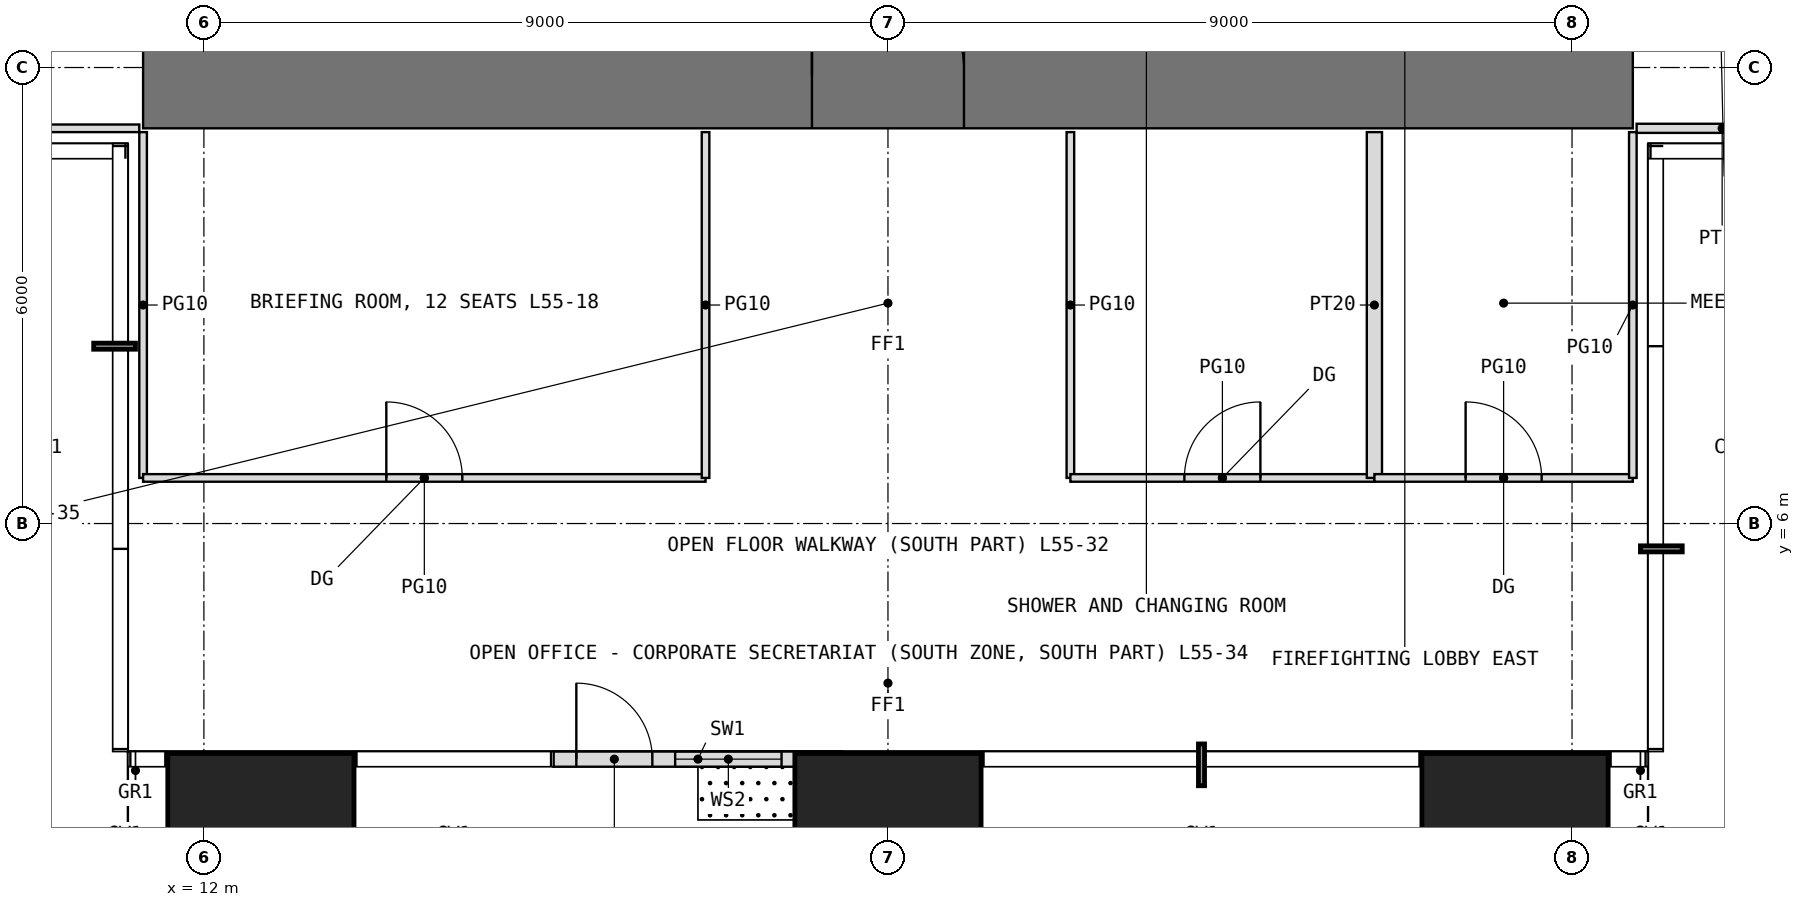
"""IFC4 building model, lengths in metres.
Left out: names, types, materials, properties, quantities, classifications, styles, units other than length and angle.
Written with IfcOpenShell. Run it as: python <this file> out.ifc"""

import sys

from ifc_helpers import new_model, si_unit, direction, frame, frame_2d, origin, origin_2d, place, context, subcontext, project, spatial, rectangle, extrude, element, fill, save


model = new_model("IFC4")
c1 = context("Model", 3, precision=1e-05, world=origin(), true_north=direction((0.0, 1.0)))
c2 = subcontext(c1, "Body", "Model", "MODEL_VIEW")
j1 = project(units=[si_unit("LENGTHUNIT", "METRE"), si_unit("PLANEANGLEUNIT", "RADIAN")], contexts=[c1])
p1 = place(None, origin())
s1 = spatial("IfcSite", under=j1, at=p1, CompositionType="ELEMENT")
p2 = place(p1, origin())
s2 = spatial("IfcBuilding", under=s1, at=p2, CompositionType="ELEMENT")
p3 = place(p2, frame((0.0, 0.0, 230.5)))
s3 = spatial("IfcBuildingStorey", under=s2, at=p3, CompositionType="ELEMENT", Elevation=230.5)
for number, where, z_axis, x_axis in (
    (1, (12.75, 1.75, 0.0), (0.0, 0.0, 1.0), (1.0, 0.0, 0.0)),
    (2, (21.0, 1.75, 0.0), (0.0, 0.0, 1.0), (1.0, 0.0, 0.0)),
    (3, (29.25, 1.75, 0.0), (0.0, 0.0, 1.0), (1.0, 0.0, 0.0)),
):
    element("IfcColumn", number, at=place(p3, frame(where, z_axis=z_axis, x_axis=x_axis)), inside=s3, PredefinedType="COLUMN", context=c2, shape_type="SweptSolid", body=[
        extrude(rectangle(XDim=2.45, YDim=2.45, at=origin_2d()), origin(), (0.0, 0.0, 1.0), 4.0),
    ])
p4 = place(p3, frame((16.6, 2.9, 0.0), z_axis=(0.0, 0.0, 1.0), x_axis=(1.0, 0.0, 0.0)))
e4 = element("IfcWall", 4, at=p4, inside=s3, PredefinedType="USERDEFINED", context=c2, shape_type="SweptSolid", body=[
    extrude(rectangle(XDim=3.8, YDim=0.2, at=frame_2d((1.9, 0.0))), origin(), (0.0, 0.0, 1.0), 3.55),
])
p5 = place(p4, frame((0.3, 0.0, 0.0)))
e5 = element("IfcOpeningElement", 5, at=p5, cuts=e4, PredefinedType="OPENING", context=c2, shape_type="SweptSolid", body=[
    extrude(rectangle(XDim=1.0, YDim=2.4, at=frame_2d((0.5, 1.2))), frame((0.0, 0.11, 0.0), z_axis=(0.0, -1.0, 0.0), x_axis=(1.0, 0.0, 0.0)), (0.0, 0.0, 1.0), 0.22),
])
p6 = place(p4, frame((1.6, 0.0, 0.3)))
e6 = element("IfcOpeningElement", 6, at=p6, cuts=e4, PredefinedType="OPENING", context=c2, shape_type="SweptSolid", body=[
    extrude(rectangle(XDim=1.4, YDim=2.7, at=frame_2d((0.7, 1.35))), frame((0.0, 0.11, 0.0), z_axis=(0.0, -1.0, 0.0), x_axis=(1.0, 0.0, 0.0)), (0.0, 0.0, 1.0), 0.22),
])
p7 = place(p3, frame((11.2, 11.9, -0.05), z_axis=(0.0, 0.0, 1.0), x_axis=(1.0, 0.0, 0.0)))
e7 = element("IfcWall", 7, at=p7, inside=s3, PredefinedType="SHEAR", context=c2, shape_type="SweptSolid", body=[
    extrude(rectangle(XDim=19.6, YDim=1.4, at=frame_2d((9.8, 0.0))), origin(), (0.0, 0.0, 1.0), 3.8),
])
p8 = place(p7, frame((8.8, 0.0, 0.05)))
e8 = element("IfcOpeningElement", 8, at=p8, cuts=e7, PredefinedType="OPENING", context=c2, shape_type="SweptSolid", body=[
    extrude(rectangle(XDim=2.0, YDim=2.2, at=frame_2d((1.0, 1.1))), frame((0.0, 0.71, 0.0), z_axis=(0.0, -1.0, 0.0), x_axis=(1.0, 0.0, 0.0)), (0.0, 0.0, 1.0), 1.42),
])
p9 = place(p3, frame((8.2, 11.2, 0.0), z_axis=(0.0, 0.0, 1.0), x_axis=(1.0, 0.0, 0.0)))
e9 = element("IfcWall", 9, at=p9, inside=s3, PredefinedType="PARTITIONING", context=c2, shape_type="SweptSolid", body=[
    extrude(rectangle(XDim=2.95, YDim=0.1, at=frame_2d((1.475, 0.0))), origin(), (0.0, 0.0, 1.0), 3.55),
])
p10 = place(p3, frame((11.2, 6.6, 0.0), z_axis=(0.0, 0.0, 1.0), x_axis=(0.0, 1.0, 0.0)))
e10 = element("IfcWall", 10, at=p10, inside=s3, PredefinedType="PARTITIONING", context=c2, shape_type="SweptSolid", body=[
    extrude(rectangle(XDim=4.55, YDim=0.1, at=frame_2d((2.275, 0.0))), origin(), (0.0, 0.0, 1.0), 3.55),
])
p11 = place(p3, frame((11.2, 6.6, 0.0), z_axis=(0.0, 0.0, 1.0), x_axis=(1.0, 0.0, 0.0)))
e11 = element("IfcWall", 11, at=p11, inside=s3, PredefinedType="PARTITIONING", context=c2, shape_type="SweptSolid", body=[
    extrude(rectangle(XDim=7.4, YDim=0.1, at=frame_2d((3.7, 0.0))), origin(), (0.0, 0.0, 1.0), 3.55),
])
p12 = place(p11, frame((3.2, 0.0, 0.0)))
e12 = element("IfcOpeningElement", 12, at=p12, cuts=e11, PredefinedType="OPENING", context=c2, shape_type="SweptSolid", body=[
    extrude(rectangle(XDim=1.0, YDim=2.4, at=frame_2d((0.5, 1.2))), frame((0.0, 0.06, 0.0), z_axis=(0.0, -1.0, 0.0), x_axis=(1.0, 0.0, 0.0)), (0.0, 0.0, 1.0), 0.12),
])
for number, where, z_axis, x_axis in (
    (13, (18.6, 6.6, 0.0), (0.0, 0.0, 1.0), (0.0, 1.0, 0.0)),
    (14, (23.4, 6.6, 0.0), (0.0, 0.0, 1.0), (0.0, 1.0, 0.0)),
):
    element("IfcWall", number, at=place(p3, frame(where, z_axis=z_axis, x_axis=x_axis)), inside=s3, PredefinedType="PARTITIONING", context=c2, shape_type="SweptSolid", body=[
        extrude(rectangle(XDim=4.55, YDim=0.1, at=frame_2d((2.275, 0.0))), origin(), (0.0, 0.0, 1.0), 3.55),
    ])
p13 = place(p3, frame((23.4, 6.6, 0.0), z_axis=(0.0, 0.0, 1.0), x_axis=(1.0, 0.0, 0.0)))
e15 = element("IfcWall", 15, at=p13, inside=s3, PredefinedType="PARTITIONING", context=c2, shape_type="SweptSolid", body=[
    extrude(rectangle(XDim=4.0, YDim=0.1, at=frame_2d((2.0, 0.0))), origin(), (0.0, 0.0, 1.0), 3.55),
])
p14 = place(p13, frame((1.5, 0.0, 0.0)))
e16 = element("IfcOpeningElement", 16, at=p14, cuts=e15, PredefinedType="OPENING", context=c2, shape_type="SweptSolid", body=[
    extrude(rectangle(XDim=1.0, YDim=2.4, at=frame_2d((0.5, 1.2))), frame((0.0, 0.06, 0.0), z_axis=(0.0, -1.0, 0.0), x_axis=(1.0, 0.0, 0.0)), (0.0, 0.0, 1.0), 0.12),
])
p15 = place(p3, frame((27.4, 6.6, 0.0), z_axis=(0.0, 0.0, 1.0), x_axis=(0.0, 1.0, 0.0)))
e17 = element("IfcWall", 17, at=p15, inside=s3, PredefinedType="PARTITIONING", context=c2, shape_type="SweptSolid", body=[
    extrude(rectangle(XDim=4.55, YDim=0.2, at=frame_2d((2.275, 0.0))), origin(), (0.0, 0.0, 1.0), 3.55),
])
p16 = place(p3, frame((27.4, 6.6, 0.0), z_axis=(0.0, 0.0, 1.0), x_axis=(1.0, 0.0, 0.0)))
e18 = element("IfcWall", 18, at=p16, inside=s3, PredefinedType="PARTITIONING", context=c2, shape_type="SweptSolid", body=[
    extrude(rectangle(XDim=3.4, YDim=0.1, at=frame_2d((1.7, 0.0))), origin(), (0.0, 0.0, 1.0), 3.55),
])
p17 = place(p16, frame((1.2, 0.0, 0.0)))
e19 = element("IfcOpeningElement", 19, at=p17, cuts=e18, PredefinedType="OPENING", context=c2, shape_type="SweptSolid", body=[
    extrude(rectangle(XDim=1.0, YDim=2.4, at=frame_2d((0.5, 1.2))), frame((0.0, 0.06, 0.0), z_axis=(0.0, -1.0, 0.0), x_axis=(1.0, 0.0, 0.0)), (0.0, 0.0, 1.0), 0.12),
])
p18 = place(p3, frame((30.8, 6.6, 0.0), z_axis=(0.0, 0.0, 1.0), x_axis=(0.0, 1.0, 0.0)))
e20 = element("IfcWall", 20, at=p18, inside=s3, PredefinedType="PARTITIONING", context=c2, shape_type="SweptSolid", body=[
    extrude(rectangle(XDim=4.55, YDim=0.1, at=frame_2d((2.275, 0.0))), origin(), (0.0, 0.0, 1.0), 3.55),
])
p19 = place(p3, frame((30.85, 11.2, 0.0), z_axis=(0.0, 0.0, 1.0), x_axis=(1.0, 0.0, 0.0)))
e21 = element("IfcWall", 21, at=p19, inside=s3, PredefinedType="PARTITIONING", context=c2, shape_type="SweptSolid", body=[
    extrude(rectangle(XDim=2.25, YDim=0.12, at=frame_2d((1.125, 0.0))), origin(), (0.0, 0.0, 1.0), 3.55),
])
p20 = place(p5, origin())
e22 = element("IfcDoor", 22, at=p20, inside=s3, OperationType="SINGLE_SWING_LEFT", PredefinedType="DOOR", context=c2, shape_type="SweptSolid", body=[
    extrude(rectangle(XDim=1.0, YDim=2.4, at=frame_2d((0.5, 1.2))), frame((0.0, 0.025, 0.0), z_axis=(0.0, -1.0, 0.0), x_axis=(1.0, 0.0, 0.0)), (0.0, 0.0, 1.0), 0.05),
])
fill(e5, e22)
p21 = place(p6, origin())
e23 = element("IfcWindow", 23, at=p21, inside=s3, PartitioningType="SINGLE_PANEL", PredefinedType="WINDOW", context=c2, shape_type="SweptSolid", body=[
    extrude(rectangle(XDim=1.4, YDim=2.7, at=frame_2d((0.7, 1.35))), frame((0.0, 0.03, 0.0), z_axis=(0.0, -1.0, 0.0), x_axis=(1.0, 0.0, 0.0)), (0.0, 0.0, 1.0), 0.06),
])
fill(e6, e23)
p22 = place(p8, origin())
e24 = element("IfcDoor", 24, at=p22, inside=s3, OperationType="DOUBLE_DOOR_SINGLE_SWING", PredefinedType="DOOR", context=c2, shape_type="SweptSolid", body=[
    extrude(rectangle(XDim=2.0, YDim=2.2, at=frame_2d((1.0, 1.1))), frame((0.0, 0.025, 0.0), z_axis=(0.0, -1.0, 0.0), x_axis=(1.0, 0.0, 0.0)), (0.0, 0.0, 1.0), 0.05),
])
fill(e8, e24)
p23 = place(p12, origin())
e25 = element("IfcDoor", 25, at=p23, inside=s3, OperationType="SINGLE_SWING_LEFT", PredefinedType="DOOR", context=c2, shape_type="SweptSolid", body=[
    extrude(rectangle(XDim=1.0, YDim=2.4, at=frame_2d((0.5, 1.2))), frame((0.0, 0.025, 0.0), z_axis=(0.0, -1.0, 0.0), x_axis=(1.0, 0.0, 0.0)), (0.0, 0.0, 1.0), 0.05),
])
fill(e12, e25)
p24 = place(p14, origin())
e26 = element("IfcDoor", 26, at=p24, inside=s3, OperationType="SINGLE_SWING_RIGHT", PredefinedType="DOOR", context=c2, shape_type="SweptSolid", body=[
    extrude(rectangle(XDim=1.0, YDim=2.4, at=frame_2d((0.5, 1.2))), frame((0.0, 0.025, 0.0), z_axis=(0.0, -1.0, 0.0), x_axis=(1.0, 0.0, 0.0)), (0.0, 0.0, 1.0), 0.05),
])
fill(e16, e26)
p25 = place(p17, origin())
e27 = element("IfcDoor", 27, at=p25, inside=s3, OperationType="SINGLE_SWING_LEFT", PredefinedType="DOOR", context=c2, shape_type="SweptSolid", body=[
    extrude(rectangle(XDim=1.0, YDim=2.4, at=frame_2d((0.5, 1.2))), frame((0.0, 0.025, 0.0), z_axis=(0.0, -1.0, 0.0), x_axis=(1.0, 0.0, 0.0)), (0.0, 0.0, 1.0), 0.05),
])
fill(e19, e27)
save(model, sys.argv[1])
